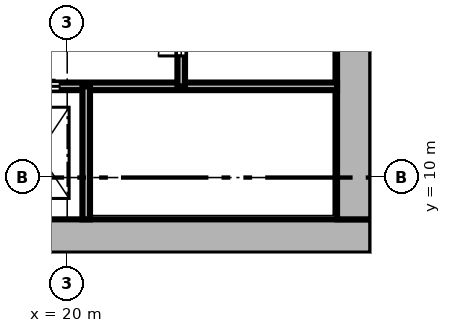
"""IFC4 building model, lengths in metres.
Left out: names, types, materials, properties, quantities, classifications, styles, units other than length and angle.
Written with IfcOpenShell. Run it as: python <this file> out.ifc"""

import sys

from ifc_helpers import new_model, si_unit, direction, frame, frame_2d, origin, place, context, subcontext, project, spatial, rectangle, extrude, element, fill, save


model = new_model("IFC4")
c1 = context("Model", 3, precision=1e-05, world=origin(), true_north=direction((0.0, 1.0)))
c2 = subcontext(c1, "Body", "Model", "MODEL_VIEW")
j1 = project(units=[si_unit("LENGTHUNIT", "METRE"), si_unit("PLANEANGLEUNIT", "RADIAN")], contexts=[c1])
p1 = place(None, origin())
s1 = spatial("IfcSite", under=j1, at=p1, CompositionType="ELEMENT")
p2 = place(p1, origin())
s2 = spatial("IfcBuilding", under=s1, at=p2, CompositionType="ELEMENT")
p3 = place(p2, frame((0.0, 0.0, 6.0)))
s3 = spatial("IfcBuildingStorey", under=s2, at=p3, CompositionType="ELEMENT", Elevation=6.0)
p4 = place(p3, frame((8.0, 8.45, 0.0), z_axis=(0.0, 0.0, 1.0), x_axis=(1.0, 0.0, 0.0)))
e1 = element("IfcWall", 1, at=p4, inside=s3, PredefinedType="SHEAR", context=c2, shape_type="SweptSolid", body=[
    extrude(rectangle(XDim=20.0, YDim=0.9, at=frame_2d((10.0, 0.0))), origin(), (0.0, 0.0, 1.0), 6.0),
])
p5 = place(p3, frame((27.55, 8.9, 0.0), z_axis=(0.0, 0.0, 1.0), x_axis=(0.0, 1.0, 0.0)))
e2 = element("IfcWall", 2, at=p5, inside=s3, PredefinedType="SHEAR", context=c2, shape_type="SweptSolid", body=[
    extrude(rectangle(XDim=18.2, YDim=0.9, at=frame_2d((9.1, 0.0))), origin(), (0.0, 0.0, 1.0), 6.0),
])
p6 = place(p5, frame((4.55, 0.0, 0.0)))
e3 = element("IfcOpeningElement", 3, at=p6, cuts=e2, PredefinedType="OPENING", context=c2, shape_type="SweptSolid", body=[
    extrude(rectangle(XDim=1.6, YDim=2.1, at=frame_2d((0.8, 1.05))), frame((0.0, 0.46, 0.0), z_axis=(0.0, -1.0, 0.0), x_axis=(1.0, 0.0, 0.0)), (0.0, 0.0, 1.0), 0.92),
])
p7 = place(p3, frame((13.8, 12.4, 0.0), z_axis=(0.0, 0.0, 1.0), x_axis=(1.0, 0.0, 0.0)))
e4 = element("IfcWall", 4, at=p7, inside=s3, PredefinedType="SHEAR", context=c2, shape_type="SweptSolid", body=[
    extrude(rectangle(XDim=13.3, YDim=0.2, at=frame_2d((6.65, 0.0))), origin(), (0.0, 0.0, 1.0), 5.68),
])
p8 = place(p7, frame((2.4, 0.0, 0.0)))
e5 = element("IfcOpeningElement", 5, at=p8, cuts=e4, PredefinedType="OPENING", context=c2, shape_type="SweptSolid", body=[
    extrude(rectangle(XDim=1.1, YDim=2.1, at=frame_2d((0.55, 1.05))), frame((0.0, 0.11, 0.0), z_axis=(0.0, -1.0, 0.0), x_axis=(1.0, 0.0, 0.0)), (0.0, 0.0, 1.0), 0.22),
])
p9 = place(p7, frame((4.9, 0.0, 0.0)))
e6 = element("IfcOpeningElement", 6, at=p9, cuts=e4, PredefinedType="OPENING", context=c2, shape_type="SweptSolid", body=[
    extrude(rectangle(XDim=1.1, YDim=2.1, at=frame_2d((0.55, 1.05))), frame((0.0, 0.11, 0.0), z_axis=(0.0, -1.0, 0.0), x_axis=(1.0, 0.0, 0.0)), (0.0, 0.0, 1.0), 0.22),
])
p10 = place(p7, frame((0.25, 0.0, 0.0)))
e7 = element("IfcOpeningElement", 7, at=p10, cuts=e4, PredefinedType="OPENING", context=c2, shape_type="SweptSolid", body=[
    extrude(rectangle(XDim=1.0, YDim=2.1, at=frame_2d((0.5, 1.05))), frame((0.0, 0.11, 0.0), z_axis=(0.0, -1.0, 0.0), x_axis=(1.0, 0.0, 0.0)), (0.0, 0.0, 1.0), 0.22),
])
p11 = place(p3, frame((20.5, 8.9, 0.0), z_axis=(0.0, 0.0, 1.0), x_axis=(0.0, 1.0, 0.0)))
e8 = element("IfcWall", 8, at=p11, inside=s3, PredefinedType="SHEAR", context=c2, shape_type="SweptSolid", body=[
    extrude(rectangle(XDim=3.5, YDim=0.2, at=frame_2d((1.75, 0.0))), origin(), (0.0, 0.0, 1.0), 5.68),
])
p12 = place(p3, frame((23.0, 12.4, 0.0), z_axis=(0.0, 0.0, 1.0), x_axis=(0.0, 1.0, 0.0)))
e9 = element("IfcWall", 9, at=p12, inside=s3, PredefinedType="SHEAR", context=c2, shape_type="SweptSolid", body=[
    extrude(rectangle(XDim=2.8, YDim=0.2, at=frame_2d((1.4, 0.0))), origin(), (0.0, 0.0, 1.0), 5.68),
])
p13 = place(p12, frame((0.8, 0.0, 0.0)))
e10 = element("IfcOpeningElement", 10, at=p13, cuts=e9, PredefinedType="OPENING", context=c2, shape_type="SweptSolid", body=[
    extrude(rectangle(XDim=1.2, YDim=2.1, at=frame_2d((0.6, 1.05))), frame((0.0, 0.11, 0.0), z_axis=(0.0, -1.0, 0.0), x_axis=(1.0, 0.0, 0.0)), (0.0, 0.0, 1.0), 0.22),
])
p14 = place(p9, origin())
e11 = element("IfcDoor", 11, at=p14, inside=s3, OperationType="DOUBLE_DOOR_SLIDING", PredefinedType="DOOR", context=c2, shape_type="SweptSolid", body=[
    extrude(rectangle(XDim=1.1, YDim=2.1, at=frame_2d((0.55, 1.05))), frame((0.0, 0.025, 0.0), z_axis=(0.0, -1.0, 0.0), x_axis=(1.0, 0.0, 0.0)), (0.0, 0.0, 1.0), 0.05),
])
fill(e6, e11)
p15 = place(p13, origin())
e12 = element("IfcDoor", 12, at=p15, inside=s3, OperationType="DOUBLE_DOOR_SINGLE_SWING", PredefinedType="DOOR", context=c2, shape_type="SweptSolid", body=[
    extrude(rectangle(XDim=1.2, YDim=2.1, at=frame_2d((0.6, 1.05))), frame((0.0, 0.025, 0.0), z_axis=(0.0, -1.0, 0.0), x_axis=(1.0, 0.0, 0.0)), (0.0, 0.0, 1.0), 0.05),
])
fill(e10, e12)
save(model, sys.argv[1])
